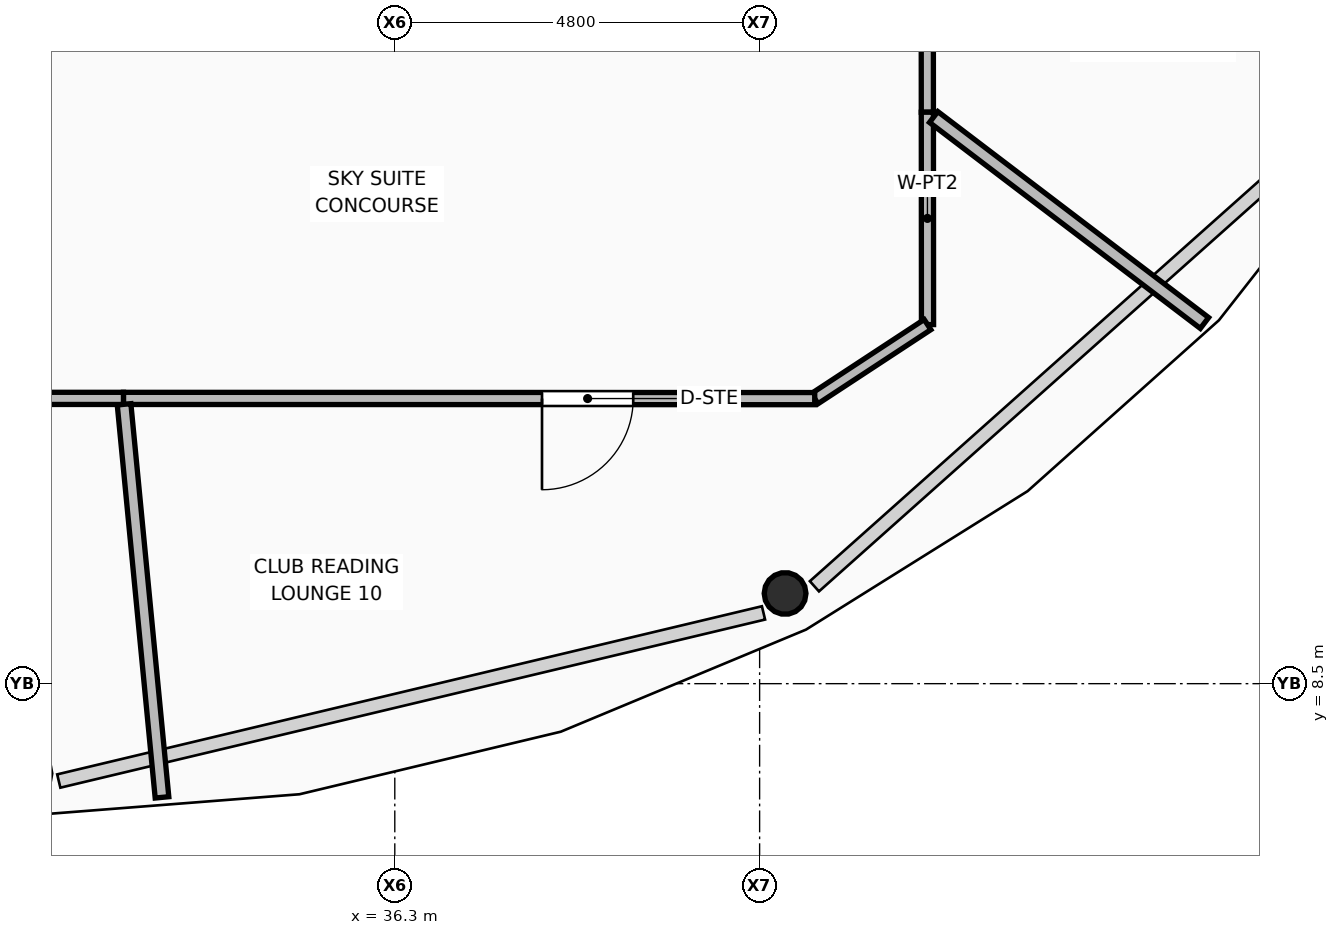
"""IFC4 building model, lengths in metres.
Left out: names, types, materials, properties, quantities, classifications, styles, units other than length and angle.
Written with IfcOpenShell. Run it as: python <this file> out.ifc"""

import sys

from ifc_helpers import new_model, si_unit, direction, frame, frame_2d, origin, origin_2d, place, context, subcontext, project, spatial, rectangle, hollow_circle, extrude, element, fill, save


model = new_model("IFC4")
c1 = context("Model", 3, precision=1e-05, world=origin(), true_north=direction((0.0, 1.0)))
c2 = subcontext(c1, "Body", "Model", "MODEL_VIEW")
j1 = project(units=[si_unit("LENGTHUNIT", "METRE"), si_unit("PLANEANGLEUNIT", "RADIAN")], contexts=[c1])
p1 = place(None, origin())
s1 = spatial("IfcSite", under=j1, at=p1, CompositionType="ELEMENT")
p2 = place(p1, origin())
s2 = spatial("IfcBuilding", under=s1, at=p2, CompositionType="ELEMENT")
p3 = place(p2, frame((0.0, 0.0, 263.85)))
s3 = spatial("IfcBuildingStorey", under=s2, at=p3, CompositionType="ELEMENT", Elevation=263.85)
p4 = place(p3, frame((41.435, 9.687, 0.0), z_axis=(-0.01121363183, 0.017093950961, 0.999791003811), x_axis=(-0.8361437835, -0.548510321976, 0.0)))
e1 = element("IfcColumn", 1, at=p4, inside=s3, PredefinedType="COLUMN", context=c2, shape_type="SweptSolid", body=[
    extrude(hollow_circle(Radius=0.275, WallThickness=0.025, at=origin_2d()), origin(), (0.0, 0.0, 1.0), 3.571),
])
p5 = place(p3, frame((43.303, 21.158, 0.0), z_axis=(0.0, 0.0, 1.0), x_axis=(0.000759986481, -0.99999971121, 0.0)))
e2 = element("IfcWall", 2, at=p5, inside=s3, PredefinedType="PARTITIONING", context=c2, shape_type="SweptSolid", body=[
    extrude(rectangle(XDim=5.14, YDim=0.16, at=frame_2d((2.57, 0.0))), origin(), (0.0, 0.0, 1.0), 3.132),
])
p6 = place(p5, frame((0.601, 0.0, 0.0)))
e3 = element("IfcOpeningElement", 3, at=p6, cuts=e2, PredefinedType="OPENING", context=c2, shape_type="SweptSolid", body=[
    extrude(rectangle(XDim=1.0, YDim=2.1, at=frame_2d((0.5, 1.05))), frame((0.0, 0.09, 0.0), z_axis=(0.0, -1.0, 0.0), x_axis=(1.0, 0.0, 0.0)), (0.0, 0.0, 1.0), 0.18),
])
p7 = place(p3, frame((43.307, 16.018, 0.0), z_axis=(0.0, 0.0, 1.0), x_axis=(0.000786438065, -0.999999690758, 0.0)))
e4 = element("IfcWall", 4, at=p7, inside=s3, PredefinedType="PARTITIONING", context=c2, shape_type="SweptSolid", body=[
    extrude(rectangle(XDim=2.794, YDim=0.16, at=frame_2d((1.397, 0.0))), origin(), (0.0, 0.0, 1.0), 3.55),
])
p8 = place(p3, frame((43.309, 13.224, 0.0), z_axis=(0.0, 0.0, 1.0), x_axis=(-0.836006510541, -0.548719522464, 0.0)))
e5 = element("IfcWall", 5, at=p8, inside=s3, PredefinedType="PARTITIONING", context=c2, shape_type="SweptSolid", body=[
    extrude(rectangle(XDim=1.775, YDim=0.16, at=frame_2d((0.888, 0.0))), origin(), (0.0, 0.0, 1.0), 3.55),
])
p9 = place(p3, frame((41.825, 12.25, 0.0), z_axis=(0.0, 0.0, 1.0), x_axis=(-0.999999948119, 0.000322121692, 0.0)))
e6 = element("IfcWall", 6, at=p9, inside=s3, PredefinedType="PARTITIONING", context=c2, shape_type="SweptSolid", body=[
    extrude(rectangle(XDim=9.095, YDim=0.16, at=frame_2d((4.547, 0.0))), origin(), (0.0, 0.0, 1.0), 3.132),
])
p10 = place(p9, frame((2.388, 0.0, 0.0)))
e7 = element("IfcOpeningElement", 7, at=p10, cuts=e6, PredefinedType="OPENING", context=c2, shape_type="SweptSolid", body=[
    extrude(rectangle(XDim=1.2, YDim=2.1, at=frame_2d((0.6, 1.05))), frame((0.0, 0.09, 0.0), z_axis=(0.0, -1.0, 0.0), x_axis=(1.0, 0.0, 0.0)), (0.0, 0.0, 1.0), 0.18),
])
p11 = place(p3, frame((32.73, 12.253, 0.0), z_axis=(0.0, 0.0, 1.0), x_axis=(-0.99999996242, 0.000274151701, 0.0)))
e8 = element("IfcWall", 8, at=p11, inside=s3, PredefinedType="PARTITIONING", context=c2, shape_type="SweptSolid", body=[
    extrude(rectangle(XDim=11.577, YDim=0.16, at=frame_2d((5.789, 0.0))), origin(), (0.0, 0.0, 1.0), 3.132),
])
p12 = place(p11, frame((5.809, 0.0, 0.0)))
e9 = element("IfcOpeningElement", 9, at=p12, cuts=e8, PredefinedType="OPENING", context=c2, shape_type="SweptSolid", body=[
    extrude(rectangle(XDim=1.0, YDim=2.1, at=frame_2d((0.5, 1.05))), frame((0.0, 0.09, 0.0), z_axis=(0.0, -1.0, 0.0), x_axis=(1.0, 0.0, 0.0)), (0.0, 0.0, 1.0), 0.18),
])
p13 = place(p3, frame((32.738, 12.175, 0.0), z_axis=(0.0, 0.0, 1.0), x_axis=(0.096055357657, -0.995375993414, 0.0)))
e10 = element("IfcWall", 10, at=p13, inside=s3, PredefinedType="PARTITIONING", context=c2, shape_type="SweptSolid", body=[
    extrude(rectangle(XDim=5.195, YDim=0.18, at=frame_2d((2.598, 0.0))), origin(), (0.0, 0.0, 1.0), 3.003),
])
p14 = place(p3, frame((43.39, 15.955, 0.0), z_axis=(0.0, 0.0, 1.0), x_axis=(0.795937236287, -0.605379150526, 0.0)))
e11 = element("IfcWall", 11, at=p14, inside=s3, PredefinedType="PARTITIONING", context=c2, shape_type="SweptSolid", body=[
    extrude(rectangle(XDim=4.477, YDim=0.18, at=frame_2d((2.238, 0.0))), origin(), (0.0, 0.0, 1.0), 3.003),
])
p15 = place(p10, origin())
e12 = element("IfcDoor", 12, at=p15, inside=s3, OperationType="SINGLE_SWING_RIGHT", PredefinedType="DOOR", context=c2, shape_type="SweptSolid", body=[
    extrude(rectangle(XDim=1.2, YDim=2.1, at=frame_2d((0.6, 1.05))), frame((0.0, 0.025, 0.0), z_axis=(0.0, -1.0, 0.0), x_axis=(1.0, 0.0, 0.0)), (0.0, 0.0, 1.0), 0.05),
])
fill(e7, e12)
save(model, sys.argv[1])
